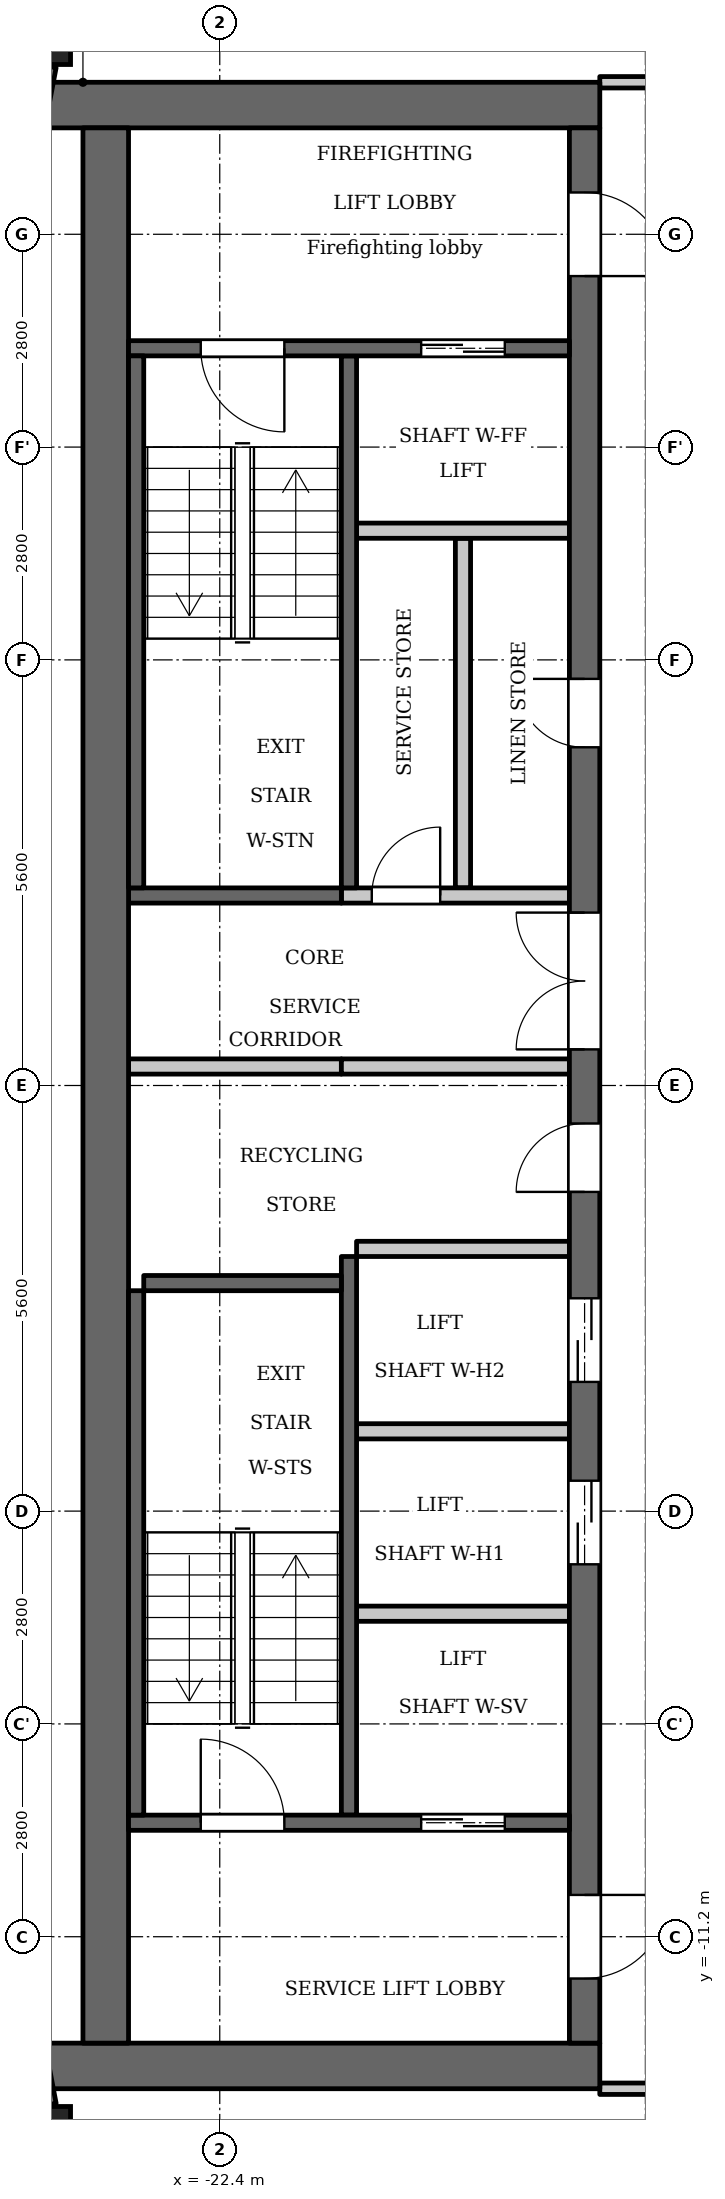
"""IFC4 building model, lengths in metres.
Left out: names, types, materials, properties, quantities, classifications, styles, units other than length and angle.
Written with IfcOpenShell. Run it as: python <this file> out.ifc"""

import sys

from ifc_helpers import new_model, si_unit, direction, frame, frame_2d, origin, origin_2d, place, context, subcontext, project, spatial, rectangle, extrude, element, fill, save


model = new_model("IFC4")
c1 = context("Model", 3, precision=1e-05, world=origin(), true_north=direction((0.0, 1.0)))
c2 = subcontext(c1, "Body", "Model", "MODEL_VIEW")
j1 = project(units=[si_unit("LENGTHUNIT", "METRE"), si_unit("PLANEANGLEUNIT", "RADIAN")], contexts=[c1])
p1 = place(None, origin())
s1 = spatial("IfcSite", under=j1, at=p1, CompositionType="ELEMENT")
p2 = place(p1, origin())
s2 = spatial("IfcBuilding", under=s1, at=p2, CompositionType="ELEMENT")
p3 = place(p2, frame((0.0, 0.0, 266.2)))
s3 = spatial("IfcBuildingStorey", under=s2, at=p3, CompositionType="ELEMENT", Elevation=266.2)
for number, where, z_axis, x_axis in (
    (1, (-24.738, 13.809, 0.0), (0.0, 0.0, 1.0), (1.0, 0.0, 0.0)),
    (2, (-24.738, -13.809, 0.0), (0.0, 0.0, 1.0), (1.0, 0.0, 0.0)),
):
    element("IfcColumn", number, at=place(p3, frame(where, z_axis=z_axis, x_axis=x_axis)), inside=s3, PredefinedType="COLUMN", context=c2, shape_type="SweptSolid", body=[
        extrude(rectangle(XDim=0.75, YDim=0.75, at=origin_2d()), origin(), (0.0, 0.0, 1.0), 3.5),
    ])
for number, where, z_axis, x_axis in (
    (3, (-24.7, 13.42, 0.0), (0.0, 0.0, 1.0), (-0.187, -0.982, 0.0)),
    (4, (-25.053, -11.572, 0.0), (0.0, 0.0, 1.0), (0.187, -0.982, 0.0)),
):
    element("IfcWall", number, at=place(p3, frame(where, z_axis=z_axis, x_axis=x_axis)), inside=s3, PredefinedType="SOLIDWALL", context=c2, shape_type="SweptSolid", body=[
        extrude(rectangle(XDim=1.881, YDim=0.3, at=frame_2d((0.941, 0.0))), origin(), (0.0, 0.0, 1.0), 2.55),
    ])
p4 = place(p3, frame((-20.7, 2.6, 0.0), z_axis=(0.0, 0.0, 1.0), x_axis=(0.0, 1.0, 0.0)))
e5 = element("IfcWall", 5, at=p4, inside=s3, PredefinedType="SHEAR", context=c2, shape_type="SweptSolid", body=[
    extrude(rectangle(XDim=7.0, YDim=0.2, at=frame_2d((3.5, 0.0))), origin(), (0.0, 0.0, 1.0), 3.2),
])
p5 = place(p3, frame((-20.7, -9.6, 0.0), z_axis=(0.0, 0.0, 1.0), x_axis=(0.0, 1.0, 0.0)))
e6 = element("IfcWall", 6, at=p5, inside=s3, PredefinedType="SHEAR", context=c2, shape_type="SweptSolid", body=[
    extrude(rectangle(XDim=7.35, YDim=0.2, at=frame_2d((3.675, 0.0))), origin(), (0.0, 0.0, 1.0), 3.2),
])
p6 = place(p3, frame((-20.8, 2.5, 0.0), z_axis=(0.0, 0.0, 1.0), x_axis=(-1.0, 0.0, 0.0)))
e7 = element("IfcWall", 7, at=p6, inside=s3, PredefinedType="SHEAR", context=c2, shape_type="SweptSolid", body=[
    extrude(rectangle(XDim=2.8, YDim=0.2, at=frame_2d((1.4, 0.0))), origin(), (0.0, 0.0, 1.0), 3.2),
])
p7 = place(p3, frame((-20.8, 0.25, 0.0), z_axis=(0.0, 0.0, 1.0), x_axis=(-1.0, 0.0, 0.0)))
e8 = element("IfcWall", 8, at=p7, inside=s3, PredefinedType="PARTITIONING", context=c2, shape_type="SweptSolid", body=[
    extrude(rectangle(XDim=2.8, YDim=0.2, at=frame_2d((1.4, 0.0))), origin(), (0.0, 0.0, 1.0), 3.2),
])
for number, where, z_axis, x_axis in (
    (9, (-17.4, 12.9, 0.0), (0.0, 0.0, 1.0), (-1.0, 0.0, 0.0)),
    (10, (-17.4, -12.9, 0.0), (0.0, 0.0, 1.0), (-1.0, 0.0, 0.0)),
):
    element("IfcWall", number, at=place(p3, frame(where, z_axis=z_axis, x_axis=x_axis)), inside=s3, PredefinedType="SHEAR", context=c2, shape_type="SweptSolid", body=[
        extrude(rectangle(XDim=7.32, YDim=0.6, at=frame_2d((3.66, 0.0))), origin(), (0.0, 0.0, 1.0), 3.2),
    ])
p8 = place(p3, frame((-19.2, 2.6, 0.0), z_axis=(0.0, 0.0, 1.0), x_axis=(0.0, 1.0, 0.0)))
e11 = element("IfcWall", 11, at=p8, inside=s3, PredefinedType="PARTITIONING", context=c2, shape_type="SweptSolid", body=[
    extrude(rectangle(XDim=4.6, YDim=0.2, at=frame_2d((2.3, 0.0))), origin(), (0.0, 0.0, 1.0), 3.2),
])
p9 = place(p3, frame((-17.6, -12.6, 0.0), z_axis=(0.0, 0.0, 1.0), x_axis=(0.0, 1.0, 0.0)))
e12 = element("IfcWall", 12, at=p9, inside=s3, PredefinedType="SHEAR", context=c2, shape_type="SweptSolid", body=[
    extrude(rectangle(XDim=25.2, YDim=0.4, at=frame_2d((12.6, 0.0))), origin(), (0.0, 0.0, 1.0), 3.2),
])
p10 = place(p9, frame((6.3, 0.0, 0.0)))
e13 = element("IfcOpeningElement", 13, at=p10, cuts=e12, PredefinedType="OPENING", context=c2, shape_type="SweptSolid", body=[
    extrude(rectangle(XDim=1.1, YDim=2.1, at=frame_2d((0.55, 1.05))), frame((0.0, 0.21, 0.0), z_axis=(0.0, -1.0, 0.0), x_axis=(1.0, 0.0, 0.0)), (0.0, 0.0, 1.0), 0.42),
])
p11 = place(p9, frame((8.7, 0.0, 0.0)))
e14 = element("IfcOpeningElement", 14, at=p11, cuts=e12, PredefinedType="OPENING", context=c2, shape_type="SweptSolid", body=[
    extrude(rectangle(XDim=1.1, YDim=2.1, at=frame_2d((0.55, 1.05))), frame((0.0, 0.21, 0.0), z_axis=(0.0, -1.0, 0.0), x_axis=(1.0, 0.0, 0.0)), (0.0, 0.0, 1.0), 0.42),
])
p12 = place(p9, frame((11.2, 0.0, 0.0)))
e15 = element("IfcOpeningElement", 15, at=p12, cuts=e12, PredefinedType="OPENING", context=c2, shape_type="SweptSolid", body=[
    extrude(rectangle(XDim=0.9, YDim=2.1, at=frame_2d((0.45, 1.05))), frame((0.0, 0.21, 0.0), z_axis=(0.0, -1.0, 0.0), x_axis=(1.0, 0.0, 0.0)), (0.0, 0.0, 1.0), 0.42),
])
p13 = place(p9, frame((17.05, 0.0, 0.0)))
e16 = element("IfcOpeningElement", 16, at=p13, cuts=e12, PredefinedType="OPENING", context=c2, shape_type="SweptSolid", body=[
    extrude(rectangle(XDim=0.9, YDim=2.1, at=frame_2d((0.45, 1.05))), frame((0.0, 0.21, 0.0), z_axis=(0.0, -1.0, 0.0), x_axis=(1.0, 0.0, 0.0)), (0.0, 0.0, 1.0), 0.42),
])
p14 = place(p9, frame((23.25, 0.0, 0.0)))
e17 = element("IfcOpeningElement", 17, at=p14, cuts=e12, PredefinedType="OPENING", context=c2, shape_type="SweptSolid", body=[
    extrude(rectangle(XDim=1.1, YDim=2.1, at=frame_2d((0.55, 1.05))), frame((0.0, 0.21, 0.0), z_axis=(0.0, -1.0, 0.0), x_axis=(1.0, 0.0, 0.0)), (0.0, 0.0, 1.0), 0.42),
])
p15 = place(p9, frame((0.85, 0.0, 0.0)))
e18 = element("IfcOpeningElement", 18, at=p15, cuts=e12, PredefinedType="OPENING", context=c2, shape_type="SweptSolid", body=[
    extrude(rectangle(XDim=1.1, YDim=2.1, at=frame_2d((0.55, 1.05))), frame((0.0, 0.21, 0.0), z_axis=(0.0, -1.0, 0.0), x_axis=(1.0, 0.0, 0.0)), (0.0, 0.0, 1.0), 0.42),
])
p16 = place(p9, frame((13.075, 0.0, 0.0)))
e19 = element("IfcOpeningElement", 19, at=p16, cuts=e12, PredefinedType="OPENING", context=c2, shape_type="SweptSolid", body=[
    extrude(rectangle(XDim=1.8, YDim=2.1, at=frame_2d((0.9, 1.05))), frame((0.0, 0.21, 0.0), z_axis=(0.0, -1.0, 0.0), x_axis=(1.0, 0.0, 0.0)), (0.0, 0.0, 1.0), 0.42),
])
p17 = place(p3, frame((-23.9, -12.6, 0.0), z_axis=(0.0, 0.0, 1.0), x_axis=(0.0, 1.0, 0.0)))
e20 = element("IfcWall", 20, at=p17, inside=s3, PredefinedType="SHEAR", context=c2, shape_type="SweptSolid", body=[
    extrude(rectangle(XDim=25.2, YDim=0.6, at=frame_2d((12.6, 0.0))), origin(), (0.0, 0.0, 1.0), 3.2),
])
p18 = place(p3, frame((-17.8, -9.7, 0.0), z_axis=(0.0, 0.0, 1.0), x_axis=(-1.0, 0.0, 0.0)))
e21 = element("IfcWall", 21, at=p18, inside=s3, PredefinedType="SHEAR", context=c2, shape_type="SweptSolid", body=[
    extrude(rectangle(XDim=5.8, YDim=0.2, at=frame_2d((2.9, 0.0))), origin(), (0.0, 0.0, 1.0), 3.2),
])
p19 = place(p18, frame((0.85, 0.0, 0.0)))
e22 = element("IfcOpeningElement", 22, at=p19, cuts=e21, PredefinedType="OPENING", context=c2, shape_type="SweptSolid", body=[
    extrude(rectangle(XDim=1.1, YDim=2.1, at=frame_2d((0.55, 1.05))), frame((0.0, 0.11, 0.0), z_axis=(0.0, -1.0, 0.0), x_axis=(1.0, 0.0, 0.0)), (0.0, 0.0, 1.0), 0.22),
])
p20 = place(p18, frame((3.75, 0.0, 0.0)))
e23 = element("IfcOpeningElement", 23, at=p20, cuts=e21, PredefinedType="OPENING", context=c2, shape_type="SweptSolid", body=[
    extrude(rectangle(XDim=1.1, YDim=2.1, at=frame_2d((0.55, 1.05))), frame((0.0, 0.11, 0.0), z_axis=(0.0, -1.0, 0.0), x_axis=(1.0, 0.0, 0.0)), (0.0, 0.0, 1.0), 0.22),
])
for number, where, z_axis, x_axis in (
    (24, (-17.8, -6.95, 0.0), (0.0, 0.0, 1.0), (-1.0, 0.0, 0.0)),
    (25, (-17.8, -4.55, 0.0), (0.0, 0.0, 1.0), (-1.0, 0.0, 0.0)),
    (26, (-17.8, -2.15, 0.0), (0.0, 0.0, 1.0), (-1.0, 0.0, 0.0)),
):
    element("IfcWall", number, at=place(p3, frame(where, z_axis=z_axis, x_axis=x_axis)), inside=s3, PredefinedType="PARTITIONING", context=c2, shape_type="SweptSolid", body=[
        extrude(rectangle(XDim=2.8, YDim=0.2, at=frame_2d((1.4, 0.0))), origin(), (0.0, 0.0, 1.0), 3.2),
    ])
p21 = place(p3, frame((-17.8, 0.25, 0.0), z_axis=(0.0, 0.0, 1.0), x_axis=(-1.0, 0.0, 0.0)))
e27 = element("IfcWall", 27, at=p21, inside=s3, PredefinedType="PARTITIONING", context=c2, shape_type="SweptSolid", body=[
    extrude(rectangle(XDim=3.0, YDim=0.2, at=frame_2d((1.5, 0.0))), origin(), (0.0, 0.0, 1.0), 3.2),
])
p22 = place(p3, frame((-17.8, 2.5, 0.0), z_axis=(0.0, 0.0, 1.0), x_axis=(-1.0, 0.0, 0.0)))
e28 = element("IfcWall", 28, at=p22, inside=s3, PredefinedType="PARTITIONING", context=c2, shape_type="SweptSolid", body=[
    extrude(rectangle(XDim=3.0, YDim=0.2, at=frame_2d((1.5, 0.0))), origin(), (0.0, 0.0, 1.0), 3.2),
])
p23 = place(p22, frame((1.7, 0.0, 0.0)))
e29 = element("IfcOpeningElement", 29, at=p23, cuts=e28, PredefinedType="OPENING", context=c2, shape_type="SweptSolid", body=[
    extrude(rectangle(XDim=0.9, YDim=2.1, at=frame_2d((0.45, 1.05))), frame((0.0, 0.11, 0.0), z_axis=(0.0, -1.0, 0.0), x_axis=(1.0, 0.0, 0.0)), (0.0, 0.0, 1.0), 0.22),
])
p24 = place(p3, frame((-17.8, 7.3, 0.0), z_axis=(0.0, 0.0, 1.0), x_axis=(-1.0, 0.0, 0.0)))
e30 = element("IfcWall", 30, at=p24, inside=s3, PredefinedType="PARTITIONING", context=c2, shape_type="SweptSolid", body=[
    extrude(rectangle(XDim=2.8, YDim=0.2, at=frame_2d((1.4, 0.0))), origin(), (0.0, 0.0, 1.0), 3.2),
])
p25 = place(p3, frame((-17.8, 9.7, 0.0), z_axis=(0.0, 0.0, 1.0), x_axis=(-1.0, 0.0, 0.0)))
e31 = element("IfcWall", 31, at=p25, inside=s3, PredefinedType="SHEAR", context=c2, shape_type="SweptSolid", body=[
    extrude(rectangle(XDim=5.8, YDim=0.2, at=frame_2d((2.9, 0.0))), origin(), (0.0, 0.0, 1.0), 3.2),
])
p26 = place(p25, frame((0.85, 0.0, 0.0)))
e32 = element("IfcOpeningElement", 32, at=p26, cuts=e31, PredefinedType="OPENING", context=c2, shape_type="SweptSolid", body=[
    extrude(rectangle(XDim=1.1, YDim=2.1, at=frame_2d((0.55, 1.05))), frame((0.0, 0.11, 0.0), z_axis=(0.0, -1.0, 0.0), x_axis=(1.0, 0.0, 0.0)), (0.0, 0.0, 1.0), 0.22),
])
p27 = place(p25, frame((3.75, 0.0, 0.0)))
e33 = element("IfcOpeningElement", 33, at=p27, cuts=e31, PredefinedType="OPENING", context=c2, shape_type="SweptSolid", body=[
    extrude(rectangle(XDim=1.1, YDim=2.1, at=frame_2d((0.55, 1.05))), frame((0.0, 0.11, 0.0), z_axis=(0.0, -1.0, 0.0), x_axis=(1.0, 0.0, 0.0)), (0.0, 0.0, 1.0), 0.22),
])
p28 = place(p3, frame((-23.5, 2.6, 0.0), z_axis=(0.0, 0.0, 1.0), x_axis=(0.0, 1.0, 0.0)))
e34 = element("IfcWall", 34, at=p28, inside=s3, PredefinedType="SHEAR", context=c2, shape_type="SweptSolid", body=[
    extrude(rectangle(XDim=7.0, YDim=0.2, at=frame_2d((3.5, 0.0))), origin(), (0.0, 0.0, 1.0), 3.2),
])
p29 = place(p3, frame((-23.5, -9.6, 0.0), z_axis=(0.0, 0.0, 1.0), x_axis=(0.0, 1.0, 0.0)))
e35 = element("IfcWall", 35, at=p29, inside=s3, PredefinedType="SHEAR", context=c2, shape_type="SweptSolid", body=[
    extrude(rectangle(XDim=6.9, YDim=0.2, at=frame_2d((3.45, 0.0))), origin(), (0.0, 0.0, 1.0), 3.2),
])
p30 = place(p3, frame((-20.8, -2.6, 0.0), z_axis=(0.0, 0.0, 1.0), x_axis=(-1.0, 0.0, 0.0)))
e36 = element("IfcWall", 36, at=p30, inside=s3, PredefinedType="SHEAR", context=c2, shape_type="SweptSolid", body=[
    extrude(rectangle(XDim=2.6, YDim=0.2, at=frame_2d((1.3, 0.0))), origin(), (0.0, 0.0, 1.0), 3.2),
])
p31 = place(p3, frame((-17.4, -13.2, 0.0), z_axis=(0.0, 0.0, 1.0), x_axis=(1.0, 0.0, 0.0)))
e37 = element("IfcWall", 37, at=p31, inside=s3, PredefinedType="PARTITIONING", context=c2, shape_type="SweptSolid", body=[
    extrude(rectangle(XDim=2.325, YDim=0.15, at=frame_2d((1.163, 0.0))), origin(), (0.0, 0.0, 1.0), 3.2),
])
p32 = place(p31, frame((0.65, 0.0, 0.0)))
e38 = element("IfcOpeningElement", 38, at=p32, cuts=e37, PredefinedType="OPENING", context=c2, shape_type="SweptSolid", body=[
    extrude(rectangle(XDim=1.0, YDim=2.1, at=frame_2d((0.5, 1.05))), frame((0.0, 0.085, 0.0), z_axis=(0.0, -1.0, 0.0), x_axis=(1.0, 0.0, 0.0)), (0.0, 0.0, 1.0), 0.17),
])
p33 = place(p3, frame((-17.4, 13.2, 0.0), z_axis=(0.0, 0.0, 1.0), x_axis=(1.0, 0.0, 0.0)))
e39 = element("IfcWall", 39, at=p33, inside=s3, PredefinedType="PARTITIONING", context=c2, shape_type="SweptSolid", body=[
    extrude(rectangle(XDim=2.325, YDim=0.15, at=frame_2d((1.163, 0.0))), origin(), (0.0, 0.0, 1.0), 3.2),
])
p34 = place(p33, frame((0.75, 0.0, 0.0)))
e40 = element("IfcOpeningElement", 40, at=p34, cuts=e39, PredefinedType="OPENING", context=c2, shape_type="SweptSolid", body=[
    extrude(rectangle(XDim=1.0, YDim=2.1, at=frame_2d((0.5, 1.05))), frame((0.0, 0.085, 0.0), z_axis=(0.0, -1.0, 0.0), x_axis=(1.0, 0.0, 0.0)), (0.0, 0.0, 1.0), 0.17),
])
p35 = place(p19, origin())
e41 = element("IfcDoor", 41, at=p35, inside=s3, OperationType="DOUBLE_DOOR_SLIDING", PredefinedType="DOOR", context=c2, shape_type="SweptSolid", body=[
    extrude(rectangle(XDim=1.1, YDim=2.1, at=frame_2d((0.55, 1.05))), frame((0.0, 0.025, 0.0), z_axis=(0.0, -1.0, 0.0), x_axis=(1.0, 0.0, 0.0)), (0.0, 0.0, 1.0), 0.05),
])
fill(e22, e41)
p36 = place(p10, origin())
e42 = element("IfcDoor", 42, at=p36, inside=s3, OperationType="DOUBLE_DOOR_SLIDING", PredefinedType="DOOR", context=c2, shape_type="SweptSolid", body=[
    extrude(rectangle(XDim=1.1, YDim=2.1, at=frame_2d((0.55, 1.05))), frame((0.0, 0.025, 0.0), z_axis=(0.0, -1.0, 0.0), x_axis=(1.0, 0.0, 0.0)), (0.0, 0.0, 1.0), 0.05),
])
fill(e13, e42)
p37 = place(p11, origin())
e43 = element("IfcDoor", 43, at=p37, inside=s3, OperationType="DOUBLE_DOOR_SLIDING", PredefinedType="DOOR", context=c2, shape_type="SweptSolid", body=[
    extrude(rectangle(XDim=1.1, YDim=2.1, at=frame_2d((0.55, 1.05))), frame((0.0, 0.025, 0.0), z_axis=(0.0, -1.0, 0.0), x_axis=(1.0, 0.0, 0.0)), (0.0, 0.0, 1.0), 0.05),
])
fill(e14, e43)
p38 = place(p12, origin())
e44 = element("IfcDoor", 44, at=p38, inside=s3, OperationType="SINGLE_SWING_RIGHT", PredefinedType="DOOR", context=c2, shape_type="SweptSolid", body=[
    extrude(rectangle(XDim=0.9, YDim=2.1, at=frame_2d((0.45, 1.05))), frame((0.0, 0.025, 0.0), z_axis=(0.0, -1.0, 0.0), x_axis=(1.0, 0.0, 0.0)), (0.0, 0.0, 1.0), 0.05),
])
fill(e15, e44)
p39 = place(p13, origin())
e45 = element("IfcDoor", 45, at=p39, inside=s3, OperationType="SINGLE_SWING_LEFT", PredefinedType="DOOR", context=c2, shape_type="SweptSolid", body=[
    extrude(rectangle(XDim=0.9, YDim=2.1, at=frame_2d((0.45, 1.05))), frame((0.0, 0.025, 0.0), z_axis=(0.0, -1.0, 0.0), x_axis=(1.0, 0.0, 0.0)), (0.0, 0.0, 1.0), 0.05),
])
fill(e16, e45)
p40 = place(p23, origin())
e46 = element("IfcDoor", 46, at=p40, inside=s3, OperationType="SINGLE_SWING_LEFT", PredefinedType="DOOR", context=c2, shape_type="SweptSolid", body=[
    extrude(rectangle(XDim=0.9, YDim=2.1, at=frame_2d((0.45, 1.05))), frame((0.0, 0.025, 0.0), z_axis=(0.0, -1.0, 0.0), x_axis=(1.0, 0.0, 0.0)), (0.0, 0.0, 1.0), 0.05),
])
fill(e29, e46)
p41 = place(p26, origin())
e47 = element("IfcDoor", 47, at=p41, inside=s3, OperationType="DOUBLE_DOOR_SLIDING", PredefinedType="DOOR", context=c2, shape_type="SweptSolid", body=[
    extrude(rectangle(XDim=1.1, YDim=2.1, at=frame_2d((0.55, 1.05))), frame((0.0, 0.025, 0.0), z_axis=(0.0, -1.0, 0.0), x_axis=(1.0, 0.0, 0.0)), (0.0, 0.0, 1.0), 0.05),
])
fill(e32, e47)
p42 = place(p14, origin())
e48 = element("IfcDoor", 48, at=p42, inside=s3, OperationType="SINGLE_SWING_LEFT", PredefinedType="DOOR", context=c2, shape_type="SweptSolid", body=[
    extrude(rectangle(XDim=1.1, YDim=2.1, at=frame_2d((0.55, 1.05))), frame((0.0, 0.025, 0.0), z_axis=(0.0, -1.0, 0.0), x_axis=(1.0, 0.0, 0.0)), (0.0, 0.0, 1.0), 0.05),
])
fill(e17, e48)
p43 = place(p15, origin())
e49 = element("IfcDoor", 49, at=p43, inside=s3, OperationType="SINGLE_SWING_RIGHT", PredefinedType="DOOR", context=c2, shape_type="SweptSolid", body=[
    extrude(rectangle(XDim=1.1, YDim=2.1, at=frame_2d((0.55, 1.05))), frame((0.0, 0.025, 0.0), z_axis=(0.0, -1.0, 0.0), x_axis=(1.0, 0.0, 0.0)), (0.0, 0.0, 1.0), 0.05),
])
fill(e18, e49)
p44 = place(p27, origin())
e50 = element("IfcDoor", 50, at=p44, inside=s3, OperationType="SINGLE_SWING_RIGHT", PredefinedType="DOOR", context=c2, shape_type="SweptSolid", body=[
    extrude(rectangle(XDim=1.1, YDim=2.1, at=frame_2d((0.55, 1.05))), frame((0.0, 0.025, 0.0), z_axis=(0.0, -1.0, 0.0), x_axis=(1.0, 0.0, 0.0)), (0.0, 0.0, 1.0), 0.05),
])
fill(e33, e50)
p45 = place(p20, origin())
e51 = element("IfcDoor", 51, at=p45, inside=s3, OperationType="SINGLE_SWING_RIGHT", PredefinedType="DOOR", context=c2, shape_type="SweptSolid", body=[
    extrude(rectangle(XDim=1.1, YDim=2.1, at=frame_2d((0.55, 1.05))), frame((0.0, 0.025, 0.0), z_axis=(0.0, -1.0, 0.0), x_axis=(1.0, 0.0, 0.0)), (0.0, 0.0, 1.0), 0.05),
])
fill(e23, e51)
p46 = place(p16, origin())
e52 = element("IfcDoor", 52, at=p46, inside=s3, OperationType="DOUBLE_DOOR_SINGLE_SWING", PredefinedType="DOOR", context=c2, shape_type="SweptSolid", body=[
    extrude(rectangle(XDim=1.8, YDim=2.1, at=frame_2d((0.9, 1.05))), frame((0.0, 0.025, 0.0), z_axis=(0.0, -1.0, 0.0), x_axis=(1.0, 0.0, 0.0)), (0.0, 0.0, 1.0), 0.05),
])
fill(e19, e52)
save(model, sys.argv[1])
